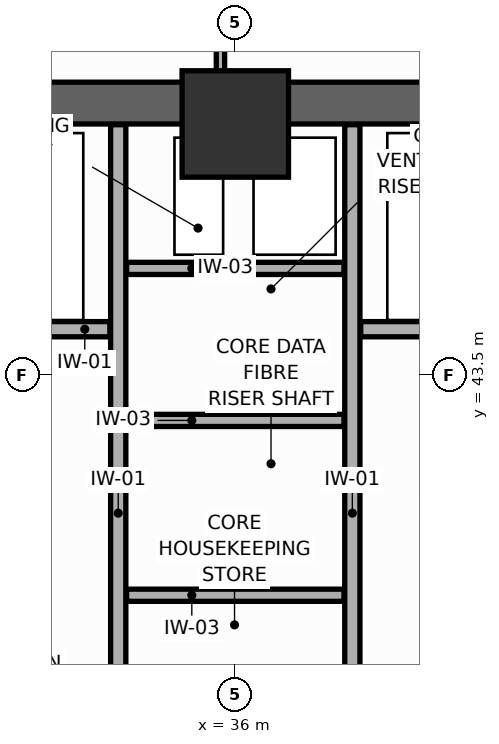
"""IFC4 building model, lengths in metres.
Left out: names, types, materials, properties, quantities, classifications, styles, units other than length and angle.
Written with IfcOpenShell. Run it as: python <this file> out.ifc"""

import sys

from ifc_helpers import new_model, si_unit, direction, frame, frame_2d, origin, origin_2d, place, context, subcontext, project, spatial, rectangle, extrude, source, transform, mapped, element, save


model = new_model("IFC4")
c1 = context("Model", 3, precision=1e-05, world=origin(), true_north=direction((0.0, 1.0)))
c2 = subcontext(c1, "Body", "Model", "MODEL_VIEW")
j1 = project(units=[si_unit("LENGTHUNIT", "METRE"), si_unit("PLANEANGLEUNIT", "RADIAN")], contexts=[c1])
p1 = place(None, origin())
s1 = spatial("IfcSite", under=j1, at=p1, CompositionType="ELEMENT")
p2 = place(p1, origin())
s2 = spatial("IfcBuilding", under=s1, at=p2, CompositionType="ELEMENT")
p3 = place(p2, frame((0.0, 0.0, 83.4)))
s3 = spatial("IfcBuildingStorey", under=s2, at=p3, CompositionType="ELEMENT", Elevation=83.4)
p4 = place(p3, frame((27.05, 47.075, 0.0), z_axis=(0.0, 0.0, 1.0), x_axis=(1.0, 0.0, 0.0)))
e1 = element("IfcWall", 1, at=p4, inside=s3, PredefinedType="SHEAR", context=c2, shape_type="SweptSolid", body=[
    extrude(rectangle(XDim=17.9, YDim=0.55, at=frame_2d((8.95, 0.0))), origin(), (0.0, 0.0, 1.0), 3.9),
])
m1 = source(origin(), c2, "Body", "SweptSolid", [
    extrude(rectangle(XDim=1.4, YDim=1.4, at=origin_2d()), origin(), (0.0, 0.0, 1.0), 3.9),
])
p5 = place(p3, frame((36.0, 46.8, 0.0), z_axis=(0.0, 0.0, 1.0), x_axis=(1.0, 0.0, 0.0)))
e2 = element("IfcColumn", 2, at=p5, inside=s3, PredefinedType="COLUMN", context=c2, shape_type="MappedRepresentation", body=[
    mapped(m1, transform((0.0, 0.0, 0.0), scale=1.0)),
])
p6 = place(p3, frame((30.97, 44.1, 0.0), z_axis=(0.0, 0.0, 1.0), x_axis=(1.0, 0.0, 0.0)))
e3 = element("IfcWall", 3, at=p6, inside=s3, PredefinedType="PARTITIONING", context=c2, shape_type="SweptSolid", body=[
    extrude(rectangle(XDim=3.38, YDim=0.2, at=frame_2d((1.69, 0.0))), origin(), (0.0, 0.0, 1.0), 3.68),
])
p7 = place(p6, frame((0.9, 0.0, 0.0)))
e4 = element("IfcOpeningElement", 4, at=p7, cuts=e3, PredefinedType="OPENING", context=c2, shape_type="SweptSolid", body=[
    extrude(rectangle(XDim=1.2, YDim=2.1, at=frame_2d((0.6, 1.05))), frame((0.0, 0.11, 0.0), z_axis=(0.0, -1.0, 0.0), x_axis=(1.0, 0.0, 0.0)), (0.0, 0.0, 1.0), 0.22),
])
p8 = place(p3, frame((37.65, 44.1, 0.0), z_axis=(0.0, 0.0, 1.0), x_axis=(1.0, 0.0, 0.0)))
e5 = element("IfcWall", 5, at=p8, inside=s3, PredefinedType="PARTITIONING", context=c2, shape_type="SweptSolid", body=[
    extrude(rectangle(XDim=3.38, YDim=0.2, at=frame_2d((1.69, 0.0))), origin(), (0.0, 0.0, 1.0), 3.68),
])
p9 = place(p8, frame((1.0, 0.0, 0.0)))
e6 = element("IfcOpeningElement", 6, at=p9, cuts=e5, PredefinedType="OPENING", context=c2, shape_type="SweptSolid", body=[
    extrude(rectangle(XDim=1.2, YDim=2.1, at=frame_2d((0.6, 1.05))), frame((0.0, 0.11, 0.0), z_axis=(0.0, -1.0, 0.0), x_axis=(1.0, 0.0, 0.0)), (0.0, 0.0, 1.0), 0.22),
])
p10 = place(p3, frame((34.46, 37.81, 0.0), z_axis=(0.0, 0.0, 1.0), x_axis=(0.0, 1.0, 0.0)))
e7 = element("IfcWall", 7, at=p10, inside=s3, PredefinedType="PARTITIONING", context=c2, shape_type="SweptSolid", body=[
    extrude(rectangle(XDim=8.98, YDim=0.2, at=frame_2d((4.49, 0.0))), origin(), (0.0, 0.0, 1.0), 3.68),
])
p11 = place(p10, frame((0.65, 0.0, 0.0)))
e8 = element("IfcOpeningElement", 8, at=p11, cuts=e7, PredefinedType="OPENING", context=c2, shape_type="SweptSolid", body=[
    extrude(rectangle(XDim=0.85, YDim=2.05, at=frame_2d((0.425, 1.025))), frame((0.0, 0.11, 0.0), z_axis=(0.0, -1.0, 0.0), x_axis=(1.0, 0.0, 0.0)), (0.0, 0.0, 1.0), 0.22),
])
p12 = place(p3, frame((37.54, 37.81, 0.0), z_axis=(0.0, 0.0, 1.0), x_axis=(0.0, 1.0, 0.0)))
e9 = element("IfcWall", 9, at=p12, inside=s3, PredefinedType="PARTITIONING", context=c2, shape_type="SweptSolid", body=[
    extrude(rectangle(XDim=8.98, YDim=0.2, at=frame_2d((4.49, 0.0))), origin(), (0.0, 0.0, 1.0), 3.68),
])
p13 = place(p12, frame((0.65, 0.0, 0.0)))
e10 = element("IfcOpeningElement", 10, at=p13, cuts=e9, PredefinedType="OPENING", context=c2, shape_type="SweptSolid", body=[
    extrude(rectangle(XDim=0.85, YDim=2.05, at=frame_2d((0.425, 1.025))), frame((0.0, 0.11, 0.0), z_axis=(0.0, -1.0, 0.0), x_axis=(1.0, 0.0, 0.0)), (0.0, 0.0, 1.0), 0.22),
])
for number, where, z_axis, x_axis in (
    (11, (34.57, 40.6, 0.0), (0.0, 0.0, 1.0), (1.0, 0.0, 0.0)),
    (12, (34.57, 42.9, 0.0), (0.0, 0.0, 1.0), (1.0, 0.0, 0.0)),
    (13, (34.57, 44.9, 0.0), (0.0, 0.0, 1.0), (1.0, 0.0, 0.0)),
):
    element("IfcWall", number, at=place(p3, frame(where, z_axis=z_axis, x_axis=x_axis)), inside=s3, PredefinedType="PARTITIONING", context=c2, shape_type="SweptSolid", body=[
        extrude(rectangle(XDim=2.86, YDim=0.16, at=frame_2d((1.43, 0.0))), origin(), (0.0, 0.0, 1.0), 3.68),
    ])
p14 = place(p3, frame((35.805, 47.352, 0.0), z_axis=(0.0, 0.0, 1.0), x_axis=(0.0, 1.0, 0.0)))
e14 = element("IfcWall", 14, at=p14, inside=s3, PredefinedType="MOVABLE", context=c2, shape_type="SweptSolid", body=[
    extrude(rectangle(XDim=8.496, YDim=0.11, at=frame_2d((4.248, 0.0))), origin(), (0.0, 0.0, 1.0), 3.68),
])
save(model, sys.argv[1])
